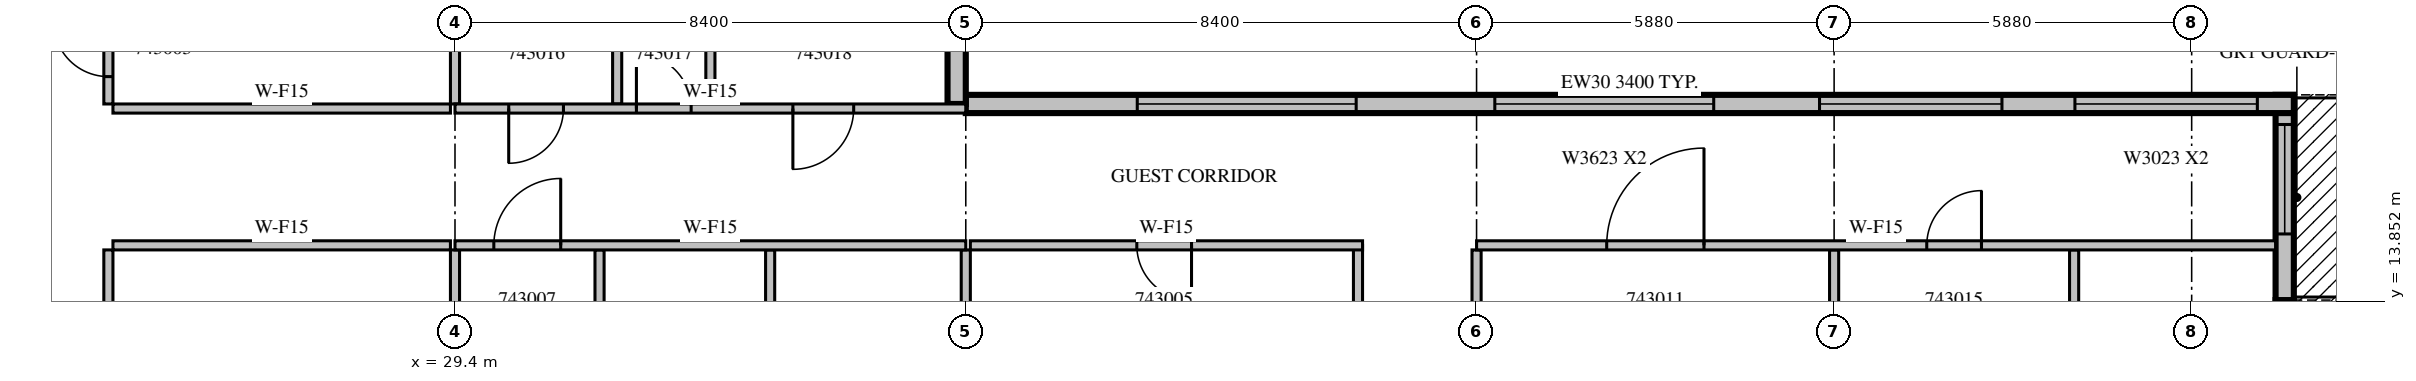
"""IFC4 building model, lengths in metres.
Left out: names, types, materials, properties, quantities, classifications, styles, units other than length and angle.
Written with IfcOpenShell. Run it as: python <this file> out.ifc"""

import sys

from ifc_helpers import new_model, si_unit, direction, frame, frame_2d, origin, place, context, subcontext, project, spatial, rectangle, extrude, source, transform, mapped, element, fill, save


model = new_model("IFC4")
c1 = context("Model", 3, precision=1e-05, world=origin(), true_north=direction((0.0, 1.0)))
c2 = subcontext(c1, "Body", "Model", "MODEL_VIEW")
j1 = project(units=[si_unit("LENGTHUNIT", "METRE"), si_unit("PLANEANGLEUNIT", "RADIAN")], contexts=[c1])
p1 = place(None, origin())
s1 = spatial("IfcSite", under=j1, at=p1, CompositionType="ELEMENT")
p2 = place(p1, origin())
s2 = spatial("IfcBuilding", under=s1, at=p2, CompositionType="ELEMENT")
p3 = place(p2, frame((0.0, 0.0, 196.8)))
s3 = spatial("IfcBuildingStorey", under=s2, at=p3, CompositionType="ELEMENT", Elevation=196.8)
m1 = source(origin(), c2, "Body", "SweptSolid", [
    extrude(rectangle(XDim=3.375, YDim=0.3, at=frame_2d((1.688, 0.0))), origin(), (0.0, 0.0, 1.0), 3.4),
])
p4 = place(p3, frame((59.49, 10.5, 0.0), z_axis=(0.0, 0.0, 1.0), x_axis=(0.0, 1.0, 0.0)))
e1 = element("IfcWall", 1, at=p4, inside=s3, PredefinedType="STANDARD", context=c2, shape_type="MappedRepresentation", body=[
    mapped(m1, transform((0.0, 0.0, 0.0), scale=1.0)),
])
m2 = source(origin(), c2, "Body", "SweptSolid", [
    extrude(rectangle(XDim=1.2, YDim=2.3, at=frame_2d((0.6, 1.15))), frame((0.0, 0.16, 0.0), z_axis=(0.0, -1.0, 0.0), x_axis=(1.0, 0.0, 0.0)), (0.0, 0.0, 1.0), 0.32),
])
p5 = place(p4, frame((1.087, 0.0, 0.6)))
e2 = element("IfcOpeningElement", 2, at=p5, cuts=e1, PredefinedType="OPENING", context=c2, shape_type="MappedRepresentation", body=[
    mapped(m2, transform((0.0, 0.0, 0.0), scale=1.0)),
])
p6 = place(p3, frame((59.49, 13.875, 0.0), z_axis=(0.0, 0.0, 1.0), x_axis=(0.0, 1.0, 0.0)))
e3 = element("IfcWall", 3, at=p6, inside=s3, PredefinedType="STANDARD", context=c2, shape_type="MappedRepresentation", body=[
    mapped(m1, transform((0.0, 0.0, 0.0), scale=1.0)),
])
m3 = source(origin(), c2, "Body", "SweptSolid", [
    extrude(rectangle(XDim=1.8, YDim=2.4, at=frame_2d((0.9, 1.2))), frame((0.0, 0.16, 0.0), z_axis=(0.0, -1.0, 0.0), x_axis=(1.0, 0.0, 0.0)), (0.0, 0.0, 1.0), 0.32),
])
p7 = place(p6, frame((1.087, 0.0, 0.0)))
e4 = element("IfcOpeningElement", 4, at=p7, cuts=e3, PredefinedType="OPENING", context=c2, shape_type="MappedRepresentation", body=[
    mapped(m3, transform((0.0, 0.0, 0.0), scale=1.0)),
])
m4 = source(origin(), c2, "Body", "SweptSolid", [
    extrude(rectangle(XDim=21.84, YDim=0.3, at=frame_2d((10.92, 0.0))), origin(), (0.0, 0.0, 1.0), 3.4),
])
p8 = place(p3, frame((59.64, 17.1, 0.0), z_axis=(0.0, 0.0, 1.0), x_axis=(-1.0, 0.0, 0.0)))
e5 = element("IfcWall", 5, at=p8, inside=s3, PredefinedType="STANDARD", context=c2, shape_type="MappedRepresentation", body=[
    mapped(m4, transform((0.0, 0.0, 0.0), scale=1.0)),
])
m5 = source(origin(), c2, "Body", "SweptSolid", [
    extrude(rectangle(XDim=3.0, YDim=2.3, at=frame_2d((1.5, 1.15))), frame((0.0, 0.16, 0.0), z_axis=(0.0, -1.0, 0.0), x_axis=(1.0, 0.0, 0.0)), (0.0, 0.0, 1.0), 0.32),
])
p9 = place(p8, frame((0.6, 0.0, 0.6)))
e6 = element("IfcOpeningElement", 6, at=p9, cuts=e5, PredefinedType="OPENING", context=c2, shape_type="MappedRepresentation", body=[
    mapped(m5, transform((0.0, 0.0, 0.0), scale=1.0)),
])
p10 = place(p8, frame((4.8, 0.0, 0.6)))
e7 = element("IfcOpeningElement", 7, at=p10, cuts=e5, PredefinedType="OPENING", context=c2, shape_type="MappedRepresentation", body=[
    mapped(m5, transform((0.0, 0.0, 0.0), scale=1.0)),
])
m6 = source(origin(), c2, "Body", "SweptSolid", [
    extrude(rectangle(XDim=3.6, YDim=2.3, at=frame_2d((1.8, 1.15))), frame((0.0, 0.16, 0.0), z_axis=(0.0, -1.0, 0.0), x_axis=(1.0, 0.0, 0.0)), (0.0, 0.0, 1.0), 0.32),
])
p11 = place(p8, frame((9.54, 0.0, 0.6)))
e8 = element("IfcOpeningElement", 8, at=p11, cuts=e5, PredefinedType="OPENING", context=c2, shape_type="MappedRepresentation", body=[
    mapped(m6, transform((0.0, 0.0, 0.0), scale=1.0)),
])
p12 = place(p8, frame((15.42, 0.0, 0.6)))
e9 = element("IfcOpeningElement", 9, at=p12, cuts=e5, PredefinedType="OPENING", context=c2, shape_type="MappedRepresentation", body=[
    mapped(m6, transform((0.0, 0.0, 0.0), scale=1.0)),
])
m7 = source(origin(), c2, "Body", "SweptSolid", [
    extrude(rectangle(XDim=3.0, YDim=0.3, at=frame_2d((1.5, 0.0))), origin(), (0.0, 0.0, 1.0), 3.4),
])
p13 = place(p3, frame((37.65, 17.1, 0.0), z_axis=(0.0, 0.0, 1.0), x_axis=(0.0, 1.0, 0.0)))
e10 = element("IfcWall", 10, at=p13, inside=s3, PredefinedType="STANDARD", context=c2, shape_type="MappedRepresentation", body=[
    mapped(m7, transform((0.0, 0.0, 0.0), scale=1.0)),
])
p14 = place(p13, frame((1.425, 0.0, 0.6)))
e11 = element("IfcOpeningElement", 11, at=p14, cuts=e10, PredefinedType="OPENING", context=c2, shape_type="MappedRepresentation", body=[
    mapped(m2, transform((0.0, 0.0, 0.0), scale=1.0)),
])
p15 = place(p3, frame((23.7, 14.7, 0.0), z_axis=(0.0, 0.0, 1.0), x_axis=(0.0, -1.0, 0.0)))
e12 = element("IfcWall", 12, at=p15, inside=s3, PredefinedType="PARTITIONING", context=c2, shape_type="SweptSolid", body=[
    extrude(rectangle(XDim=11.225, YDim=0.15, at=frame_2d((5.612, 0.0))), origin(), (0.0, 0.0, 1.0), 3.4),
])
m8 = source(origin(), c2, "Body", "SweptSolid", [
    extrude(rectangle(XDim=0.9, YDim=2.1, at=frame_2d((0.45, 1.05))), frame((0.0, 0.085, 0.0), z_axis=(0.0, -1.0, 0.0), x_axis=(1.0, 0.0, 0.0)), (0.0, 0.0, 1.0), 0.17),
])
p16 = place(p15, frame((8.463, 0.0, 0.0)))
e13 = element("IfcOpeningElement", 13, at=p16, cuts=e12, PredefinedType="OPENING", context=c2, shape_type="MappedRepresentation", body=[
    mapped(m8, transform((0.0, 0.0, 0.0), scale=1.0)),
])
p17 = place(p15, frame((1.975, 0.0, 0.0)))
e14 = element("IfcOpeningElement", 14, at=p17, cuts=e12, PredefinedType="OPENING", context=c2, shape_type="MappedRepresentation", body=[
    mapped(m8, transform((0.0, 0.0, 0.0), scale=1.0)),
])
m9 = source(origin(), c2, "Body", "SweptSolid", [
    extrude(rectangle(XDim=3.6, YDim=0.15, at=frame_2d((1.8, 0.0))), origin(), (0.0, 0.0, 1.0), 3.4),
])
p18 = place(p3, frame((23.7, 20.7, 0.0), z_axis=(0.0, 0.0, 1.0), x_axis=(0.0, -1.0, 0.0)))
e15 = element("IfcWall", 15, at=p18, inside=s3, PredefinedType="PARTITIONING", context=c2, shape_type="MappedRepresentation", body=[
    mapped(m9, transform((0.0, 0.0, 0.0), scale=1.0)),
])
p19 = place(p18, frame((2.25, 0.0, 0.0)))
e16 = element("IfcOpeningElement", 16, at=p19, cuts=e15, PredefinedType="OPENING", context=c2, shape_type="MappedRepresentation", body=[
    mapped(m8, transform((0.0, 0.0, 0.0), scale=1.0)),
])
m10 = source(origin(), c2, "Body", "SweptSolid", [
    extrude(rectangle(XDim=5.55, YDim=0.15, at=frame_2d((2.775, 0.0))), origin(), (0.0, 0.0, 1.0), 3.4),
])
for number, where, z_axis, x_axis in (
    (17, (29.325, 14.775, 0.0), (0.0, 0.0, 1.0), (-1.0, 0.0, 0.0)),
    (18, (23.775, 17.025, 0.0), (0.0, 0.0, 1.0), (1.0, 0.0, 0.0)),
):
    element("IfcWall", number, at=place(p3, frame(where, z_axis=z_axis, x_axis=x_axis)), inside=s3, PredefinedType="PARTITIONING", context=c2, shape_type="MappedRepresentation", body=[
        mapped(m10, transform((0.0, 0.0, 0.0), scale=1.0)),
    ])
m11 = source(origin(), c2, "Body", "SweptSolid", [
    extrude(rectangle(XDim=3.751, YDim=0.15, at=frame_2d((1.875, 0.0))), origin(), (0.0, 0.0, 1.0), 3.4),
])
p20 = place(p3, frame((29.4, 10.949, 0.0), z_axis=(0.0, 0.0, 1.0), x_axis=(0.0, 1.0, 0.0)))
e19 = element("IfcWall", 19, at=p20, inside=s3, PredefinedType="PARTITIONING", context=c2, shape_type="MappedRepresentation", body=[
    mapped(m11, transform((0.0, 0.0, 0.0), scale=1.0)),
])
m12 = source(origin(), c2, "Body", "SweptSolid", [
    extrude(rectangle(XDim=3.001, YDim=0.15, at=frame_2d((1.5, 0.0))), origin(), (0.0, 0.0, 1.0), 3.4),
])
p21 = place(p3, frame((29.4, 17.1, 0.0), z_axis=(0.0, 0.0, 1.0), x_axis=(0.0, 1.0, 0.0)))
e20 = element("IfcWall", 20, at=p21, inside=s3, PredefinedType="PARTITIONING", context=c2, shape_type="MappedRepresentation", body=[
    mapped(m12, transform((0.0, 0.0, 0.0), scale=1.0)),
])
m13 = source(origin(), c2, "Body", "SweptSolid", [
    extrude(rectangle(XDim=2.875, YDim=0.15, at=frame_2d((1.438, 0.0))), origin(), (0.0, 0.0, 1.0), 3.4),
])
p22 = place(p3, frame((44.25, 11.9, 0.0), z_axis=(0.0, 0.0, 1.0), x_axis=(0.0, 1.0, 0.0)))
e21 = element("IfcWall", 21, at=p22, inside=s3, PredefinedType="PARTITIONING", context=c2, shape_type="MappedRepresentation", body=[
    mapped(m13, transform((0.0, 0.0, 0.0), scale=1.0)),
])
m14 = source(origin(), c2, "Body", "SweptSolid", [
    extrude(rectangle(XDim=6.45, YDim=0.15, at=frame_2d((3.225, 0.0))), origin(), (0.0, 0.0, 1.0), 3.4),
])
p23 = place(p3, frame((44.325, 14.775, 0.0), z_axis=(0.0, 0.0, 1.0), x_axis=(-1.0, 0.0, 0.0)))
e22 = element("IfcWall", 22, at=p23, inside=s3, PredefinedType="PARTITIONING", context=c2, shape_type="MappedRepresentation", body=[
    mapped(m14, transform((0.0, 0.0, 0.0), scale=1.0)),
])
p24 = place(p23, frame((2.812, 0.0, 0.0)))
e23 = element("IfcOpeningElement", 23, at=p24, cuts=e22, PredefinedType="OPENING", context=c2, shape_type="MappedRepresentation", body=[
    mapped(m8, transform((0.0, 0.0, 0.0), scale=1.0)),
])
for number, where, z_axis, x_axis in (
    (24, (31.777, 11.1, 0.0), (0.0, 0.0, 1.0), (0.0, 1.0, 0.0)),
    (25, (34.583, 11.1, 0.0), (0.0, 0.0, 1.0), (0.0, 1.0, 0.0)),
    (26, (37.8, 11.1, 0.0), (0.0, 0.0, 1.0), (0.0, 1.0, 0.0)),
    (27, (52.08, 11.1, 0.0), (0.0, 0.0, 1.0), (0.0, 1.0, 0.0)),
    (28, (56.027, 11.1, 0.0), (0.0, 0.0, 1.0), (0.0, 1.0, 0.0)),
    (29, (46.2, 11.1, 0.0), (0.0, 0.0, 1.0), (0.0, 1.0, 0.0)),
    (30, (32.067, 20.7, 0.0), (0.0, 0.0, 1.0), (0.0, -1.0, 0.0)),
    (31, (33.6, 17.1, 0.0), (0.0, 0.0, 1.0), (0.0, 1.0, 0.0)),
):
    element("IfcWall", number, at=place(p3, frame(where, z_axis=z_axis, x_axis=x_axis)), inside=s3, PredefinedType="PARTITIONING", context=c2, shape_type="MappedRepresentation", body=[
        mapped(m9, transform((0.0, 0.0, 0.0), scale=1.0)),
    ])
m15 = source(origin(), c2, "Body", "SweptSolid", [
    extrude(rectangle(XDim=8.4, YDim=0.15, at=frame_2d((4.2, 0.0))), origin(), (0.0, 0.0, 1.0), 3.4),
])
p25 = place(p3, frame((37.8, 14.775, 0.0), z_axis=(0.0, 0.0, 1.0), x_axis=(-1.0, 0.0, 0.0)))
e32 = element("IfcWall", 32, at=p25, inside=s3, PredefinedType="PARTITIONING", context=c2, shape_type="MappedRepresentation", body=[
    mapped(m15, transform((0.0, 0.0, 0.0), scale=1.0)),
])
m16 = source(origin(), c2, "Body", "SweptSolid", [
    extrude(rectangle(XDim=1.1, YDim=2.1, at=frame_2d((0.55, 1.05))), frame((0.0, 0.085, 0.0), z_axis=(0.0, -1.0, 0.0), x_axis=(1.0, 0.0, 0.0)), (0.0, 0.0, 1.0), 0.17),
])
p26 = place(p25, frame((6.662, 0.0, 0.0)))
e33 = element("IfcOpeningElement", 33, at=p26, cuts=e32, PredefinedType="OPENING", context=c2, shape_type="MappedRepresentation", body=[
    mapped(m16, transform((0.0, 0.0, 0.0), scale=1.0)),
])
m17 = source(origin(), c2, "Body", "SweptSolid", [
    extrude(rectangle(XDim=13.14, YDim=0.15, at=frame_2d((6.57, 0.0))), origin(), (0.0, 0.0, 1.0), 3.4),
])
p27 = place(p3, frame((59.34, 14.775, 0.0), z_axis=(0.0, 0.0, 1.0), x_axis=(-1.0, 0.0, 0.0)))
e34 = element("IfcWall", 34, at=p27, inside=s3, PredefinedType="PARTITIONING", context=c2, shape_type="MappedRepresentation", body=[
    mapped(m17, transform((0.0, 0.0, 0.0), scale=1.0)),
])
m18 = source(origin(), c2, "Body", "SweptSolid", [
    extrude(rectangle(XDim=1.6, YDim=2.1, at=frame_2d((0.8, 1.05))), frame((0.0, 0.085, 0.0), z_axis=(0.0, -1.0, 0.0), x_axis=(1.0, 0.0, 0.0)), (0.0, 0.0, 1.0), 0.17),
])
p28 = place(p27, frame((9.4, 0.0, 0.0)))
e35 = element("IfcOpeningElement", 35, at=p28, cuts=e34, PredefinedType="OPENING", context=c2, shape_type="MappedRepresentation", body=[
    mapped(m18, transform((0.0, 0.0, 0.0), scale=1.0)),
])
p29 = place(p27, frame((4.837, 0.0, 0.0)))
e36 = element("IfcOpeningElement", 36, at=p29, cuts=e34, PredefinedType="OPENING", context=c2, shape_type="MappedRepresentation", body=[
    mapped(m8, transform((0.0, 0.0, 0.0), scale=1.0)),
])
p30 = place(p3, frame((29.4, 17.025, 0.0), z_axis=(0.0, 0.0, 1.0), x_axis=(1.0, 0.0, 0.0)))
e37 = element("IfcWall", 37, at=p30, inside=s3, PredefinedType="PARTITIONING", context=c2, shape_type="MappedRepresentation", body=[
    mapped(m15, transform((0.0, 0.0, 0.0), scale=1.0)),
])
p31 = place(p30, frame((0.883, 0.0, 0.0)))
e38 = element("IfcOpeningElement", 38, at=p31, cuts=e37, PredefinedType="OPENING", context=c2, shape_type="MappedRepresentation", body=[
    mapped(m8, transform((0.0, 0.0, 0.0), scale=1.0)),
])
p32 = place(p30, frame((2.983, 0.0, 0.0)))
e39 = element("IfcOpeningElement", 39, at=p32, cuts=e37, PredefinedType="OPENING", context=c2, shape_type="MappedRepresentation", body=[
    mapped(m8, transform((0.0, 0.0, 0.0), scale=1.0)),
])
m19 = source(origin(), c2, "Body", "SweptSolid", [
    extrude(rectangle(XDim=1.0, YDim=2.1, at=frame_2d((0.5, 1.05))), frame((0.0, 0.085, 0.0), z_axis=(0.0, -1.0, 0.0), x_axis=(1.0, 0.0, 0.0)), (0.0, 0.0, 1.0), 0.17),
])
p33 = place(p30, frame((5.557, 0.0, 0.0)))
e40 = element("IfcOpeningElement", 40, at=p33, cuts=e37, PredefinedType="OPENING", context=c2, shape_type="MappedRepresentation", body=[
    mapped(m19, transform((0.0, 0.0, 0.0), scale=1.0)),
])
m20 = source(origin(), c2, "Body", "SweptSolid", [
    extrude(rectangle(XDim=1.8, YDim=2.4, at=frame_2d((0.9, 1.2))), frame((0.0, 0.025, 0.0), z_axis=(0.0, -1.0, 0.0), x_axis=(1.0, 0.0, 0.0)), (0.0, 0.0, 1.0), 0.05),
])
p34 = place(p7, origin())
e41 = element("IfcDoor", 41, at=p34, inside=s3, OperationType="SLIDING_TO_LEFT", PredefinedType="DOOR", context=c2, shape_type="MappedRepresentation", body=[
    mapped(m20, transform((0.0, 0.0, 0.0), scale=1.0)),
])
fill(e4, e41)
m21 = source(origin(), c2, "Body", "SweptSolid", [
    extrude(rectangle(XDim=3.0, YDim=2.3, at=frame_2d((1.5, 1.15))), frame((0.0, 0.03, 0.0), z_axis=(0.0, -1.0, 0.0), x_axis=(1.0, 0.0, 0.0)), (0.0, 0.0, 1.0), 0.06),
])
p35 = place(p9, origin())
e42 = element("IfcWindow", 42, at=p35, inside=s3, PartitioningType="SINGLE_PANEL", PredefinedType="WINDOW", context=c2, shape_type="MappedRepresentation", body=[
    mapped(m21, transform((0.0, 0.0, 0.0), scale=1.0)),
])
fill(e6, e42)
p36 = place(p10, origin())
e43 = element("IfcWindow", 43, at=p36, inside=s3, PartitioningType="SINGLE_PANEL", PredefinedType="WINDOW", context=c2, shape_type="MappedRepresentation", body=[
    mapped(m21, transform((0.0, 0.0, 0.0), scale=1.0)),
])
fill(e7, e43)
m22 = source(origin(), c2, "Body", "SweptSolid", [
    extrude(rectangle(XDim=3.6, YDim=2.3, at=frame_2d((1.8, 1.15))), frame((0.0, 0.03, 0.0), z_axis=(0.0, -1.0, 0.0), x_axis=(1.0, 0.0, 0.0)), (0.0, 0.0, 1.0), 0.06),
])
p37 = place(p11, origin())
e44 = element("IfcWindow", 44, at=p37, inside=s3, PartitioningType="SINGLE_PANEL", PredefinedType="WINDOW", context=c2, shape_type="MappedRepresentation", body=[
    mapped(m22, transform((0.0, 0.0, 0.0), scale=1.0)),
])
fill(e8, e44)
p38 = place(p12, origin())
e45 = element("IfcWindow", 45, at=p38, inside=s3, PartitioningType="SINGLE_PANEL", PredefinedType="WINDOW", context=c2, shape_type="MappedRepresentation", body=[
    mapped(m22, transform((0.0, 0.0, 0.0), scale=1.0)),
])
fill(e9, e45)
m23 = source(origin(), c2, "Body", "SweptSolid", [
    extrude(rectangle(XDim=0.9, YDim=2.1, at=frame_2d((0.45, 1.05))), frame((0.0, 0.025, 0.0), z_axis=(0.0, -1.0, 0.0), x_axis=(1.0, 0.0, 0.0)), (0.0, 0.0, 1.0), 0.05),
])
p39 = place(p19, origin())
e46 = element("IfcDoor", 46, at=p39, inside=s3, OperationType="SINGLE_SWING_RIGHT", PredefinedType="DOOR", context=c2, shape_type="MappedRepresentation", body=[
    mapped(m23, transform((0.0, 0.0, 0.0), scale=1.0)),
])
fill(e16, e46)
p40 = place(p24, origin())
e47 = element("IfcDoor", 47, at=p40, inside=s3, OperationType="SINGLE_SWING_LEFT", PredefinedType="DOOR", context=c2, shape_type="MappedRepresentation", body=[
    mapped(m23, transform((0.0, 0.0, 0.0), scale=1.0)),
])
fill(e23, e47)
m24 = source(origin(), c2, "Body", "SweptSolid", [
    extrude(rectangle(XDim=1.1, YDim=2.1, at=frame_2d((0.55, 1.05))), frame((0.0, 0.025, 0.0), z_axis=(0.0, -1.0, 0.0), x_axis=(1.0, 0.0, 0.0)), (0.0, 0.0, 1.0), 0.05),
])
p41 = place(p26, origin())
e48 = element("IfcDoor", 48, at=p41, inside=s3, OperationType="SINGLE_SWING_RIGHT", PredefinedType="DOOR", context=c2, shape_type="MappedRepresentation", body=[
    mapped(m24, transform((0.0, 0.0, 0.0), scale=1.0)),
])
fill(e33, e48)
m25 = source(origin(), c2, "Body", "SweptSolid", [
    extrude(rectangle(XDim=1.6, YDim=2.1, at=frame_2d((0.8, 1.05))), frame((0.0, 0.025, 0.0), z_axis=(0.0, -1.0, 0.0), x_axis=(1.0, 0.0, 0.0)), (0.0, 0.0, 1.0), 0.05),
])
p42 = place(p28, origin())
e49 = element("IfcDoor", 49, at=p42, inside=s3, OperationType="SINGLE_SWING_RIGHT", PredefinedType="DOOR", context=c2, shape_type="MappedRepresentation", body=[
    mapped(m25, transform((0.0, 0.0, 0.0), scale=1.0)),
])
fill(e35, e49)
p43 = place(p29, origin())
e50 = element("IfcDoor", 50, at=p43, inside=s3, OperationType="SINGLE_SWING_RIGHT", PredefinedType="DOOR", context=c2, shape_type="MappedRepresentation", body=[
    mapped(m23, transform((0.0, 0.0, 0.0), scale=1.0)),
])
fill(e36, e50)
p44 = place(p31, origin())
e51 = element("IfcDoor", 51, at=p44, inside=s3, OperationType="SINGLE_SWING_RIGHT", PredefinedType="DOOR", context=c2, shape_type="MappedRepresentation", body=[
    mapped(m23, transform((0.0, 0.0, 0.0), scale=1.0)),
])
fill(e38, e51)
p45 = place(p32, origin())
e52 = element("IfcDoor", 52, at=p45, inside=s3, OperationType="SINGLE_SWING_LEFT", PredefinedType="DOOR", context=c2, shape_type="MappedRepresentation", body=[
    mapped(m23, transform((0.0, 0.0, 0.0), scale=1.0)),
])
fill(e39, e52)
m26 = source(origin(), c2, "Body", "SweptSolid", [
    extrude(rectangle(XDim=1.0, YDim=2.1, at=frame_2d((0.5, 1.05))), frame((0.0, 0.025, 0.0), z_axis=(0.0, -1.0, 0.0), x_axis=(1.0, 0.0, 0.0)), (0.0, 0.0, 1.0), 0.05),
])
p46 = place(p33, origin())
e53 = element("IfcDoor", 53, at=p46, inside=s3, OperationType="SINGLE_SWING_RIGHT", PredefinedType="DOOR", context=c2, shape_type="MappedRepresentation", body=[
    mapped(m26, transform((0.0, 0.0, 0.0), scale=1.0)),
])
fill(e40, e53)
save(model, sys.argv[1])
